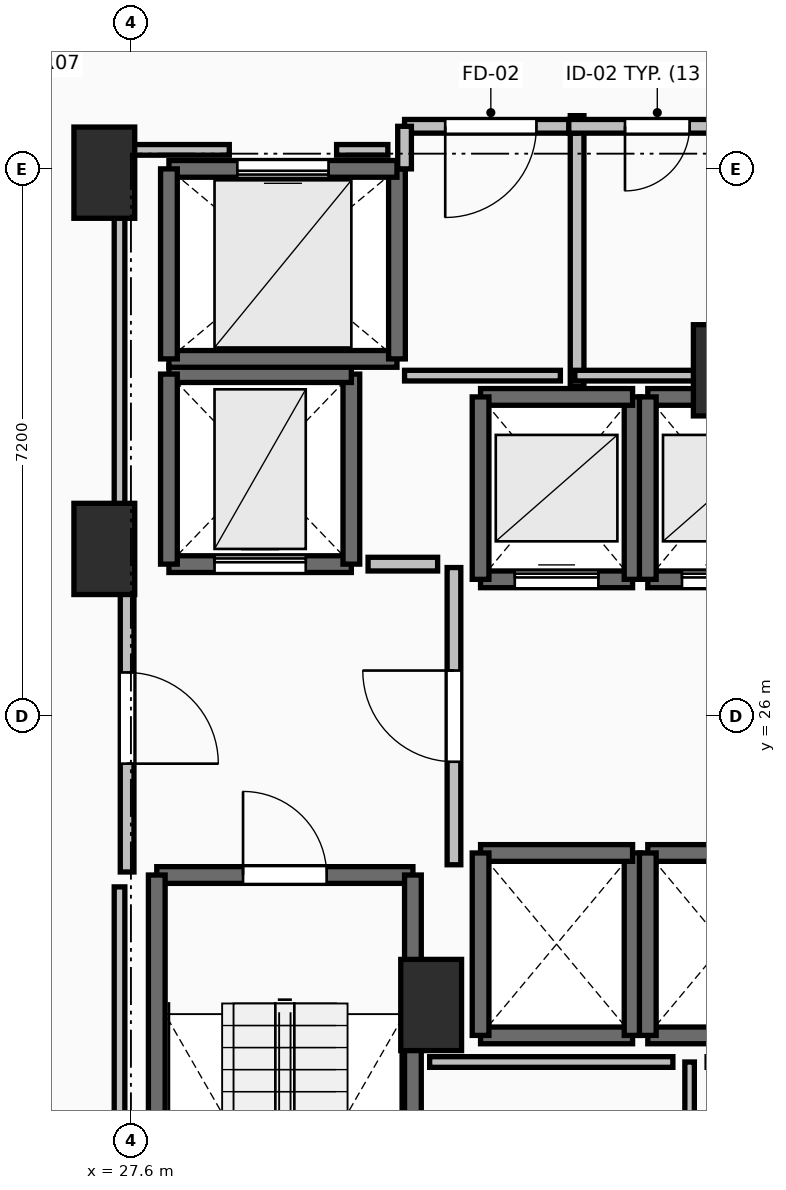
"""IFC4 building model, lengths in metres.
Left out: names, types, materials, properties, quantities, classifications, styles, units other than length and angle.
Written with IfcOpenShell. Run it as: python <this file> out.ifc"""

import sys

from ifc_helpers import new_model, si_unit, direction, frame, frame_2d, origin, origin_2d, place, context, subcontext, project, spatial, rectangle, extrude, element, fill, save


model = new_model("IFC4")
c1 = context("Model", 3, precision=1e-05, world=origin(), true_north=direction((0.0, 1.0)))
c2 = subcontext(c1, "Body", "Model", "MODEL_VIEW")
j1 = project(units=[si_unit("LENGTHUNIT", "METRE"), si_unit("PLANEANGLEUNIT", "RADIAN")], contexts=[c1])
p1 = place(None, origin())
s1 = spatial("IfcSite", under=j1, at=p1, CompositionType="ELEMENT")
p2 = place(p1, origin())
s2 = spatial("IfcBuilding", under=s1, at=p2, CompositionType="ELEMENT")
p3 = place(p2, frame((0.0, 0.0, 103.3)))
s3 = spatial("IfcBuildingStorey", under=s2, at=p3, CompositionType="ELEMENT", Elevation=103.3)
for number, where, z_axis, x_axis in (
    (1, (27.25, 28.2, 0.0), (0.0, 0.0, 1.0), (1.0, 0.0, 0.0)),
    (2, (27.25, 33.15, 0.0), (0.0, 0.0, 1.0), (1.0, 0.0, 0.0)),
    (3, (31.55, 22.2, 0.0), (0.0, 0.0, 1.0), (1.0, 0.0, 0.0)),
    (4, (35.4, 30.55, 0.0), (0.0, 0.0, 1.0), (1.0, 0.0, 0.0)),
):
    element("IfcColumn", number, at=place(p3, frame(where, z_axis=z_axis, x_axis=x_axis)), inside=s3, PredefinedType="PILASTER", context=c2, shape_type="SweptSolid", body=[
        extrude(rectangle(XDim=0.8, YDim=1.2, at=origin_2d()), origin(), (0.0, 0.0, 1.0), 3.5),
    ])
p4 = place(p3, frame((27.94, 23.91, 0.0), z_axis=(0.0, 0.0, 1.0), x_axis=(1.0, 0.0, 0.0)))
e5 = element("IfcWall", 5, at=p4, inside=s3, PredefinedType="SOLIDWALL", context=c2, shape_type="SweptSolid", body=[
    extrude(rectangle(XDim=3.37, YDim=0.22, at=frame_2d((1.685, 0.0))), origin(), (0.0, 0.0, 1.0), 3.24),
])
p5 = place(p4, frame((1.135, 0.0, 0.0)))
e6 = element("IfcOpeningElement", 6, at=p5, cuts=e5, PredefinedType="OPENING", context=c2, shape_type="SweptSolid", body=[
    extrude(rectangle(XDim=1.1, YDim=2.15, at=frame_2d((0.55, 1.075))), frame((0.0, 0.125, 0.0), z_axis=(0.0, -1.0, 0.0), x_axis=(1.0, 0.0, 0.0)), (0.0, 0.0, 1.0), 0.25),
])
for number, where, z_axis, x_axis in (
    (7, (31.31, 23.91, 0.0), (0.0, 0.0, 1.0), (0.0, -1.0, 0.0)),
    (8, (27.94, 16.49, 0.0), (0.0, 0.0, 1.0), (0.0, 1.0, 0.0)),
):
    element("IfcWall", number, at=place(p3, frame(where, z_axis=z_axis, x_axis=x_axis)), inside=s3, PredefinedType="SOLIDWALL", context=c2, shape_type="SweptSolid", body=[
        extrude(rectangle(XDim=7.42, YDim=0.22, at=frame_2d((3.71, 0.0))), origin(), (0.0, 0.0, 1.0), 3.24),
    ])
p6 = place(p3, frame((32.2, 27.8, 0.0), z_axis=(0.0, 0.0, 1.0), x_axis=(1.0, 0.0, 0.0)))
e9 = element("IfcWall", 9, at=p6, inside=s3, PredefinedType="SOLIDWALL", context=c2, shape_type="SweptSolid", body=[
    extrude(rectangle(XDim=2.0, YDim=0.22, at=frame_2d((1.0, 0.0))), origin(), (0.0, 0.0, 1.0), 3.24),
])
p7 = place(p6, frame((0.45, 0.0, 0.0)))
e10 = element("IfcOpeningElement", 10, at=p7, cuts=e9, PredefinedType="OPENING", context=c2, shape_type="SweptSolid", body=[
    extrude(rectangle(XDim=1.1, YDim=2.2, at=frame_2d((0.55, 1.1))), frame((0.0, 0.125, 0.0), z_axis=(0.0, -1.0, 0.0), x_axis=(1.0, 0.0, 0.0)), (0.0, 0.0, 1.0), 0.25),
])
p8 = place(p3, frame((34.2, 27.8, 0.0), z_axis=(0.0, 0.0, 1.0), x_axis=(0.0, 1.0, 0.0)))
e11 = element("IfcWall", 11, at=p8, inside=s3, PredefinedType="SOLIDWALL", context=c2, shape_type="SweptSolid", body=[
    extrude(rectangle(XDim=2.4, YDim=0.22, at=frame_2d((1.2, 0.0))), origin(), (0.0, 0.0, 1.0), 3.24),
])
p9 = place(p3, frame((34.2, 30.2, 0.0), z_axis=(0.0, 0.0, 1.0), x_axis=(-1.0, 0.0, 0.0)))
e12 = element("IfcWall", 12, at=p9, inside=s3, PredefinedType="SOLIDWALL", context=c2, shape_type="SweptSolid", body=[
    extrude(rectangle(XDim=2.0, YDim=0.22, at=frame_2d((1.0, 0.0))), origin(), (0.0, 0.0, 1.0), 3.24),
])
p10 = place(p3, frame((32.2, 30.2, 0.0), z_axis=(0.0, 0.0, 1.0), x_axis=(0.0, -1.0, 0.0)))
e13 = element("IfcWall", 13, at=p10, inside=s3, PredefinedType="SOLIDWALL", context=c2, shape_type="SweptSolid", body=[
    extrude(rectangle(XDim=2.4, YDim=0.22, at=frame_2d((1.2, 0.0))), origin(), (0.0, 0.0, 1.0), 3.24),
])
p11 = place(p3, frame((34.4, 27.8, 0.0), z_axis=(0.0, 0.0, 1.0), x_axis=(1.0, 0.0, 0.0)))
e14 = element("IfcWall", 14, at=p11, inside=s3, PredefinedType="SOLIDWALL", context=c2, shape_type="SweptSolid", body=[
    extrude(rectangle(XDim=2.0, YDim=0.22, at=frame_2d((1.0, 0.0))), origin(), (0.0, 0.0, 1.0), 3.24),
])
p12 = place(p11, frame((0.45, 0.0, 0.0)))
e15 = element("IfcOpeningElement", 15, at=p12, cuts=e14, PredefinedType="OPENING", context=c2, shape_type="SweptSolid", body=[
    extrude(rectangle(XDim=1.1, YDim=2.2, at=frame_2d((0.55, 1.1))), frame((0.0, 0.125, 0.0), z_axis=(0.0, -1.0, 0.0), x_axis=(1.0, 0.0, 0.0)), (0.0, 0.0, 1.0), 0.25),
])
p13 = place(p3, frame((36.4, 30.2, 0.0), z_axis=(0.0, 0.0, 1.0), x_axis=(-1.0, 0.0, 0.0)))
e16 = element("IfcWall", 16, at=p13, inside=s3, PredefinedType="SOLIDWALL", context=c2, shape_type="SweptSolid", body=[
    extrude(rectangle(XDim=2.0, YDim=0.22, at=frame_2d((1.0, 0.0))), origin(), (0.0, 0.0, 1.0), 3.24),
])
p14 = place(p3, frame((34.4, 30.2, 0.0), z_axis=(0.0, 0.0, 1.0), x_axis=(0.0, -1.0, 0.0)))
e17 = element("IfcWall", 17, at=p14, inside=s3, PredefinedType="SOLIDWALL", context=c2, shape_type="SweptSolid", body=[
    extrude(rectangle(XDim=2.4, YDim=0.22, at=frame_2d((1.2, 0.0))), origin(), (0.0, 0.0, 1.0), 3.24),
])
p15 = place(p3, frame((32.2, 21.8, 0.0), z_axis=(0.0, 0.0, 1.0), x_axis=(1.0, 0.0, 0.0)))
e18 = element("IfcWall", 18, at=p15, inside=s3, PredefinedType="SOLIDWALL", context=c2, shape_type="SweptSolid", body=[
    extrude(rectangle(XDim=2.0, YDim=0.22, at=frame_2d((1.0, 0.0))), origin(), (0.0, 0.0, 1.0), 3.24),
])
p16 = place(p3, frame((34.2, 21.8, 0.0), z_axis=(0.0, 0.0, 1.0), x_axis=(0.0, 1.0, 0.0)))
e19 = element("IfcWall", 19, at=p16, inside=s3, PredefinedType="SOLIDWALL", context=c2, shape_type="SweptSolid", body=[
    extrude(rectangle(XDim=2.4, YDim=0.22, at=frame_2d((1.2, 0.0))), origin(), (0.0, 0.0, 1.0), 3.24),
])
p17 = place(p3, frame((34.2, 24.2, 0.0), z_axis=(0.0, 0.0, 1.0), x_axis=(-1.0, 0.0, 0.0)))
e20 = element("IfcWall", 20, at=p17, inside=s3, PredefinedType="SOLIDWALL", context=c2, shape_type="SweptSolid", body=[
    extrude(rectangle(XDim=2.0, YDim=0.22, at=frame_2d((1.0, 0.0))), origin(), (0.0, 0.0, 1.0), 3.24),
])
p18 = place(p3, frame((32.2, 24.2, 0.0), z_axis=(0.0, 0.0, 1.0), x_axis=(0.0, -1.0, 0.0)))
e21 = element("IfcWall", 21, at=p18, inside=s3, PredefinedType="SOLIDWALL", context=c2, shape_type="SweptSolid", body=[
    extrude(rectangle(XDim=2.4, YDim=0.22, at=frame_2d((1.2, 0.0))), origin(), (0.0, 0.0, 1.0), 3.24),
])
for number, where, z_axis, x_axis in (
    (22, (34.4, 21.8, 0.0), (0.0, 0.0, 1.0), (1.0, 0.0, 0.0)),
    (23, (36.4, 24.2, 0.0), (0.0, 0.0, 1.0), (-1.0, 0.0, 0.0)),
):
    element("IfcWall", number, at=place(p3, frame(where, z_axis=z_axis, x_axis=x_axis)), inside=s3, PredefinedType="SOLIDWALL", context=c2, shape_type="SweptSolid", body=[
        extrude(rectangle(XDim=2.0, YDim=0.22, at=frame_2d((1.0, 0.0))), origin(), (0.0, 0.0, 1.0), 3.24),
    ])
p19 = place(p3, frame((34.4, 24.2, 0.0), z_axis=(0.0, 0.0, 1.0), x_axis=(0.0, -1.0, 0.0)))
e24 = element("IfcWall", 24, at=p19, inside=s3, PredefinedType="SOLIDWALL", context=c2, shape_type="SweptSolid", body=[
    extrude(rectangle(XDim=2.4, YDim=0.22, at=frame_2d((1.2, 0.0))), origin(), (0.0, 0.0, 1.0), 3.24),
])
p20 = place(p3, frame((28.1, 28.0, 0.0), z_axis=(0.0, 0.0, 1.0), x_axis=(1.0, 0.0, 0.0)))
e25 = element("IfcWall", 25, at=p20, inside=s3, PredefinedType="SHEAR", context=c2, shape_type="SweptSolid", body=[
    extrude(rectangle(XDim=2.4, YDim=0.22, at=frame_2d((1.2, 0.0))), origin(), (0.0, 0.0, 1.0), 3.24),
])
p21 = place(p20, frame((0.6, 0.0, 0.0)))
e26 = element("IfcOpeningElement", 26, at=p21, cuts=e25, PredefinedType="OPENING", context=c2, shape_type="SweptSolid", body=[
    extrude(rectangle(XDim=1.2, YDim=2.2, at=frame_2d((0.6, 1.1))), frame((0.0, 0.125, 0.0), z_axis=(0.0, -1.0, 0.0), x_axis=(1.0, 0.0, 0.0)), (0.0, 0.0, 1.0), 0.25),
])
p22 = place(p3, frame((30.5, 28.0, 0.0), z_axis=(0.0, 0.0, 1.0), x_axis=(0.0, 1.0, 0.0)))
e27 = element("IfcWall", 27, at=p22, inside=s3, PredefinedType="SHEAR", context=c2, shape_type="SweptSolid", body=[
    extrude(rectangle(XDim=2.5, YDim=0.22, at=frame_2d((1.25, 0.0))), origin(), (0.0, 0.0, 1.0), 3.24),
])
p23 = place(p3, frame((30.5, 30.5, 0.0), z_axis=(0.0, 0.0, 1.0), x_axis=(-1.0, 0.0, 0.0)))
e28 = element("IfcWall", 28, at=p23, inside=s3, PredefinedType="SHEAR", context=c2, shape_type="SweptSolid", body=[
    extrude(rectangle(XDim=2.4, YDim=0.22, at=frame_2d((1.2, 0.0))), origin(), (0.0, 0.0, 1.0), 3.24),
])
p24 = place(p3, frame((28.1, 30.5, 0.0), z_axis=(0.0, 0.0, 1.0), x_axis=(0.0, -1.0, 0.0)))
e29 = element("IfcWall", 29, at=p24, inside=s3, PredefinedType="SHEAR", context=c2, shape_type="SweptSolid", body=[
    extrude(rectangle(XDim=2.5, YDim=0.22, at=frame_2d((1.25, 0.0))), origin(), (0.0, 0.0, 1.0), 3.24),
])
p25 = place(p3, frame((28.1, 30.7, 0.0), z_axis=(0.0, 0.0, 1.0), x_axis=(1.0, 0.0, 0.0)))
e30 = element("IfcWall", 30, at=p25, inside=s3, PredefinedType="SOLIDWALL", context=c2, shape_type="SweptSolid", body=[
    extrude(rectangle(XDim=3.0, YDim=0.22, at=frame_2d((1.5, 0.0))), origin(), (0.0, 0.0, 1.0), 3.24),
])
p26 = place(p3, frame((31.1, 30.7, 0.0), z_axis=(0.0, 0.0, 1.0), x_axis=(0.0, 1.0, 0.0)))
e31 = element("IfcWall", 31, at=p26, inside=s3, PredefinedType="SOLIDWALL", context=c2, shape_type="SweptSolid", body=[
    extrude(rectangle(XDim=2.5, YDim=0.22, at=frame_2d((1.25, 0.0))), origin(), (0.0, 0.0, 1.0), 3.24),
])
p27 = place(p3, frame((31.1, 33.2, 0.0), z_axis=(0.0, 0.0, 1.0), x_axis=(-1.0, 0.0, 0.0)))
e32 = element("IfcWall", 32, at=p27, inside=s3, PredefinedType="SOLIDWALL", context=c2, shape_type="SweptSolid", body=[
    extrude(rectangle(XDim=3.0, YDim=0.22, at=frame_2d((1.5, 0.0))), origin(), (0.0, 0.0, 1.0), 3.24),
])
p28 = place(p27, frame((0.9, 0.0, 0.0)))
e33 = element("IfcOpeningElement", 33, at=p28, cuts=e32, PredefinedType="OPENING", context=c2, shape_type="SweptSolid", body=[
    extrude(rectangle(XDim=1.2, YDim=2.2, at=frame_2d((0.6, 1.1))), frame((0.0, 0.125, 0.0), z_axis=(0.0, -1.0, 0.0), x_axis=(1.0, 0.0, 0.0)), (0.0, 0.0, 1.0), 0.25),
])
p29 = place(p3, frame((28.1, 33.2, 0.0), z_axis=(0.0, 0.0, 1.0), x_axis=(0.0, -1.0, 0.0)))
e34 = element("IfcWall", 34, at=p29, inside=s3, PredefinedType="SOLIDWALL", context=c2, shape_type="SweptSolid", body=[
    extrude(rectangle(XDim=2.5, YDim=0.22, at=frame_2d((1.25, 0.0))), origin(), (0.0, 0.0, 1.0), 3.24),
])
p30 = place(p3, frame((31.85, 24.045, 0.0), z_axis=(0.0, 0.0, 1.0), x_axis=(0.0, 1.0, 0.0)))
e35 = element("IfcWall", 35, at=p30, inside=s3, PredefinedType="PARTITIONING", context=c2, shape_type="SweptSolid", body=[
    extrude(rectangle(XDim=3.91, YDim=0.18, at=frame_2d((1.955, 0.0))), origin(), (0.0, 0.0, 1.0), 3.24),
])
p31 = place(p30, frame((1.355, 0.0, 0.0)))
e36 = element("IfcOpeningElement", 36, at=p31, cuts=e35, PredefinedType="OPENING", context=c2, shape_type="SweptSolid", body=[
    extrude(rectangle(XDim=1.2, YDim=2.15, at=frame_2d((0.6, 1.075))), frame((0.0, 0.105, 0.0), z_axis=(0.0, -1.0, 0.0), x_axis=(1.0, 0.0, 0.0)), (0.0, 0.0, 1.0), 0.21),
])
p32 = place(p3, frame((27.55, 28.0, 0.0), z_axis=(0.0, 0.0, 1.0), x_axis=(0.0, -1.0, 0.0)))
e37 = element("IfcWall", 37, at=p32, inside=s3, PredefinedType="PARTITIONING", context=c2, shape_type="SweptSolid", body=[
    extrude(rectangle(XDim=4.05, YDim=0.18, at=frame_2d((2.025, 0.0))), origin(), (0.0, 0.0, 1.0), 3.24),
])
p33 = place(p32, frame((1.425, 0.0, 0.0)))
e38 = element("IfcOpeningElement", 38, at=p33, cuts=e37, PredefinedType="OPENING", context=c2, shape_type="SweptSolid", body=[
    extrude(rectangle(XDim=1.2, YDim=2.15, at=frame_2d((0.6, 1.075))), frame((0.0, 0.105, 0.0), z_axis=(0.0, -1.0, 0.0), x_axis=(1.0, 0.0, 0.0)), (0.0, 0.0, 1.0), 0.21),
])
p34 = place(p3, frame((33.47, 30.34, 0.0), z_axis=(0.0, 0.0, 1.0), x_axis=(0.0, 1.0, 0.0)))
e39 = element("IfcWall", 39, at=p34, inside=s3, PredefinedType="PARTITIONING", context=c2, shape_type="SweptSolid", body=[
    extrude(rectangle(XDim=3.56, YDim=0.18, at=frame_2d((1.78, 0.0))), origin(), (0.0, 0.0, 1.0), 3.24),
])
p35 = place(p3, frame((33.47, 33.76, 0.0), z_axis=(0.0, 0.0, 1.0), x_axis=(-1.0, 0.0, 0.0)))
e40 = element("IfcWall", 40, at=p35, inside=s3, PredefinedType="PARTITIONING", context=c2, shape_type="SweptSolid", body=[
    extrude(rectangle(XDim=2.27, YDim=0.18, at=frame_2d((1.135, 0.0))), origin(), (0.0, 0.0, 1.0), 3.24),
])
p36 = place(p35, frame((0.535, 0.0, 0.0)))
e41 = element("IfcOpeningElement", 41, at=p36, cuts=e40, PredefinedType="OPENING", context=c2, shape_type="SweptSolid", body=[
    extrude(rectangle(XDim=1.2, YDim=2.15, at=frame_2d((0.6, 1.075))), frame((0.0, 0.105, 0.0), z_axis=(0.0, -1.0, 0.0), x_axis=(1.0, 0.0, 0.0)), (0.0, 0.0, 1.0), 0.21),
])
p37 = place(p3, frame((31.2, 33.76, 0.0), z_axis=(0.0, 0.0, 1.0), x_axis=(0.0, -1.0, 0.0)))
e42 = element("IfcWall", 42, at=p37, inside=s3, PredefinedType="PARTITIONING", context=c2, shape_type="SweptSolid", body=[
    extrude(rectangle(XDim=0.56, YDim=0.18, at=frame_2d((0.28, 0.0))), origin(), (0.0, 0.0, 1.0), 3.24),
])
p38 = place(p3, frame((35.69, 33.76, 0.0), z_axis=(0.0, 0.0, 1.0), x_axis=(-1.0, 0.0, 0.0)))
e43 = element("IfcWall", 43, at=p38, inside=s3, PredefinedType="PARTITIONING", context=c2, shape_type="SweptSolid", body=[
    extrude(rectangle(XDim=2.33, YDim=0.18, at=frame_2d((1.165, 0.0))), origin(), (0.0, 0.0, 1.0), 3.24),
])
p39 = place(p38, frame((0.74, 0.0, 0.0)))
e44 = element("IfcOpeningElement", 44, at=p39, cuts=e43, PredefinedType="OPENING", context=c2, shape_type="SweptSolid", body=[
    extrude(rectangle(XDim=0.85, YDim=2.1, at=frame_2d((0.425, 1.05))), frame((0.0, 0.105, 0.0), z_axis=(0.0, -1.0, 0.0), x_axis=(1.0, 0.0, 0.0)), (0.0, 0.0, 1.0), 0.21),
])
p40 = place(p3, frame((34.95, 16.32, 0.0), z_axis=(0.0, 0.0, 1.0), x_axis=(0.0, 1.0, 0.0)))
e45 = element("IfcWall", 45, at=p40, inside=s3, PredefinedType="PARTITIONING", context=c2, shape_type="SweptSolid", body=[
    extrude(rectangle(XDim=5.13, YDim=0.125, at=frame_2d((2.565, 0.0))), origin(), (0.0, 0.0, 1.0), 3.24),
])
p41 = place(p3, frame((31.635, 28.0, 0.0), z_axis=(0.0, 0.0, 1.0), x_axis=(-1.0, 0.0, 0.0)))
e46 = element("IfcWall", 46, at=p41, inside=s3, PredefinedType="PARTITIONING", context=c2, shape_type="SweptSolid", body=[
    extrude(rectangle(XDim=0.915, YDim=0.18, at=frame_2d((0.458, 0.0))), origin(), (0.0, 0.0, 1.0), 3.24),
])
p42 = place(p3, frame((31.2, 30.48, 0.0), z_axis=(0.0, 0.0, 1.0), x_axis=(1.0, 0.0, 0.0)))
e47 = element("IfcWall", 47, at=p42, inside=s3, PredefinedType="PARTITIONING", context=c2, shape_type="SweptSolid", body=[
    extrude(rectangle(XDim=2.05, YDim=0.14, at=frame_2d((1.025, 0.0))), origin(), (0.0, 0.0, 1.0), 3.24),
])
p43 = place(p3, frame((33.44, 30.48, 0.0), z_axis=(0.0, 0.0, 1.0), x_axis=(1.0, 0.0, 0.0)))
e48 = element("IfcWall", 48, at=p43, inside=s3, PredefinedType="PARTITIONING", context=c2, shape_type="SweptSolid", body=[
    extrude(rectangle(XDim=2.14, YDim=0.14, at=frame_2d((1.07, 0.0))), origin(), (0.0, 0.0, 1.0), 2.432),
])
p44 = place(p3, frame((34.73, 21.45, 0.0), z_axis=(0.0, 0.0, 1.0), x_axis=(-1.0, 0.0, 0.0)))
e49 = element("IfcWall", 49, at=p44, inside=s3, PredefinedType="PARTITIONING", context=c2, shape_type="SweptSolid", body=[
    extrude(rectangle(XDim=3.2, YDim=0.14, at=frame_2d((1.6, 0.0))), origin(), (0.0, 0.0, 1.0), 3.24),
])
p45 = place(p3, frame((27.45, 16.24, 0.0), z_axis=(0.0, 0.0, 1.0), x_axis=(0.0, 1.0, 0.0)))
e50 = element("IfcWall", 50, at=p45, inside=s3, PredefinedType="PARTITIONING", context=c2, shape_type="SweptSolid", body=[
    extrude(rectangle(XDim=7.514, YDim=0.14, at=frame_2d((3.757, 0.0))), origin(), (0.0, 0.0, 1.0), 2.432),
])
p46 = place(p3, frame((27.45, 28.196, 0.0), z_axis=(0.0, 0.0, 1.0), x_axis=(0.0, 1.0, 0.0)))
e51 = element("IfcWall", 51, at=p46, inside=s3, PredefinedType="PARTITIONING", context=c2, shape_type="SweptSolid", body=[
    extrude(rectangle(XDim=5.254, YDim=0.14, at=frame_2d((2.627, 0.0))), origin(), (0.0, 0.0, 1.0), 2.432),
])
p47 = place(p3, frame((27.45, 33.45, 0.0), z_axis=(0.0, 0.0, 1.0), x_axis=(1.0, 0.0, 0.0)))
e52 = element("IfcWall", 52, at=p47, inside=s3, PredefinedType="PARTITIONING", context=c2, shape_type="SweptSolid", body=[
    extrude(rectangle(XDim=1.444, YDim=0.14, at=frame_2d((0.722, 0.0))), origin(), (0.0, 0.0, 1.0), 2.432),
])
p48 = place(p3, frame((30.306, 33.45, 0.0), z_axis=(0.0, 0.0, 1.0), x_axis=(1.0, 0.0, 0.0)))
e53 = element("IfcWall", 53, at=p48, inside=s3, PredefinedType="PARTITIONING", context=c2, shape_type="SweptSolid", body=[
    extrude(rectangle(XDim=0.674, YDim=0.14, at=frame_2d((0.337, 0.0))), origin(), (0.0, 0.0, 1.0), 3.24),
])
p49 = place(p5, origin())
e54 = element("IfcDoor", 54, at=p49, inside=s3, OperationType="SINGLE_SWING_LEFT", PredefinedType="DOOR", context=c2, shape_type="SweptSolid", body=[
    extrude(rectangle(XDim=1.1, YDim=2.15, at=frame_2d((0.55, 1.075))), frame((0.0, 0.025, 0.0), z_axis=(0.0, -1.0, 0.0), x_axis=(1.0, 0.0, 0.0)), (0.0, 0.0, 1.0), 0.05),
])
fill(e6, e54)
p50 = place(p7, origin())
e55 = element("IfcDoor", 55, at=p50, inside=s3, OperationType="SLIDING_TO_LEFT", PredefinedType="DOOR", context=c2, shape_type="SweptSolid", body=[
    extrude(rectangle(XDim=1.1, YDim=2.2, at=frame_2d((0.55, 1.1))), frame((0.0, 0.025, 0.0), z_axis=(0.0, -1.0, 0.0), x_axis=(1.0, 0.0, 0.0)), (0.0, 0.0, 1.0), 0.05),
])
fill(e10, e55)
p51 = place(p12, origin())
e56 = element("IfcDoor", 56, at=p51, inside=s3, OperationType="SLIDING_TO_LEFT", PredefinedType="DOOR", context=c2, shape_type="SweptSolid", body=[
    extrude(rectangle(XDim=1.1, YDim=2.2, at=frame_2d((0.55, 1.1))), frame((0.0, 0.025, 0.0), z_axis=(0.0, -1.0, 0.0), x_axis=(1.0, 0.0, 0.0)), (0.0, 0.0, 1.0), 0.05),
])
fill(e15, e56)
p52 = place(p21, origin())
e57 = element("IfcDoor", 57, at=p52, inside=s3, OperationType="SLIDING_TO_LEFT", PredefinedType="DOOR", context=c2, shape_type="SweptSolid", body=[
    extrude(rectangle(XDim=1.2, YDim=2.2, at=frame_2d((0.6, 1.1))), frame((0.0, 0.025, 0.0), z_axis=(0.0, -1.0, 0.0), x_axis=(1.0, 0.0, 0.0)), (0.0, 0.0, 1.0), 0.05),
])
fill(e26, e57)
p53 = place(p28, origin())
e58 = element("IfcDoor", 58, at=p53, inside=s3, OperationType="SLIDING_TO_LEFT", PredefinedType="DOOR", context=c2, shape_type="SweptSolid", body=[
    extrude(rectangle(XDim=1.2, YDim=2.2, at=frame_2d((0.6, 1.1))), frame((0.0, 0.025, 0.0), z_axis=(0.0, -1.0, 0.0), x_axis=(1.0, 0.0, 0.0)), (0.0, 0.0, 1.0), 0.05),
])
fill(e33, e58)
p54 = place(p31, origin())
e59 = element("IfcDoor", 59, at=p54, inside=s3, OperationType="SINGLE_SWING_RIGHT", PredefinedType="DOOR", context=c2, shape_type="SweptSolid", body=[
    extrude(rectangle(XDim=1.2, YDim=2.15, at=frame_2d((0.6, 1.075))), frame((0.0, 0.025, 0.0), z_axis=(0.0, -1.0, 0.0), x_axis=(1.0, 0.0, 0.0)), (0.0, 0.0, 1.0), 0.05),
])
fill(e36, e59)
p55 = place(p33, origin())
e60 = element("IfcDoor", 60, at=p55, inside=s3, OperationType="SINGLE_SWING_RIGHT", PredefinedType="DOOR", context=c2, shape_type="SweptSolid", body=[
    extrude(rectangle(XDim=1.2, YDim=2.15, at=frame_2d((0.6, 1.075))), frame((0.0, 0.025, 0.0), z_axis=(0.0, -1.0, 0.0), x_axis=(1.0, 0.0, 0.0)), (0.0, 0.0, 1.0), 0.05),
])
fill(e38, e60)
p56 = place(p36, origin())
e61 = element("IfcDoor", 61, at=p56, inside=s3, OperationType="SINGLE_SWING_RIGHT", PredefinedType="DOOR", context=c2, shape_type="SweptSolid", body=[
    extrude(rectangle(XDim=1.2, YDim=2.15, at=frame_2d((0.6, 1.075))), frame((0.0, 0.025, 0.0), z_axis=(0.0, -1.0, 0.0), x_axis=(1.0, 0.0, 0.0)), (0.0, 0.0, 1.0), 0.05),
])
fill(e41, e61)
p57 = place(p39, origin())
e62 = element("IfcDoor", 62, at=p57, inside=s3, OperationType="SINGLE_SWING_RIGHT", PredefinedType="DOOR", context=c2, shape_type="SweptSolid", body=[
    extrude(rectangle(XDim=0.85, YDim=2.1, at=frame_2d((0.425, 1.05))), frame((0.0, 0.025, 0.0), z_axis=(0.0, -1.0, 0.0), x_axis=(1.0, 0.0, 0.0)), (0.0, 0.0, 1.0), 0.05),
])
fill(e44, e62)
save(model, sys.argv[1])
